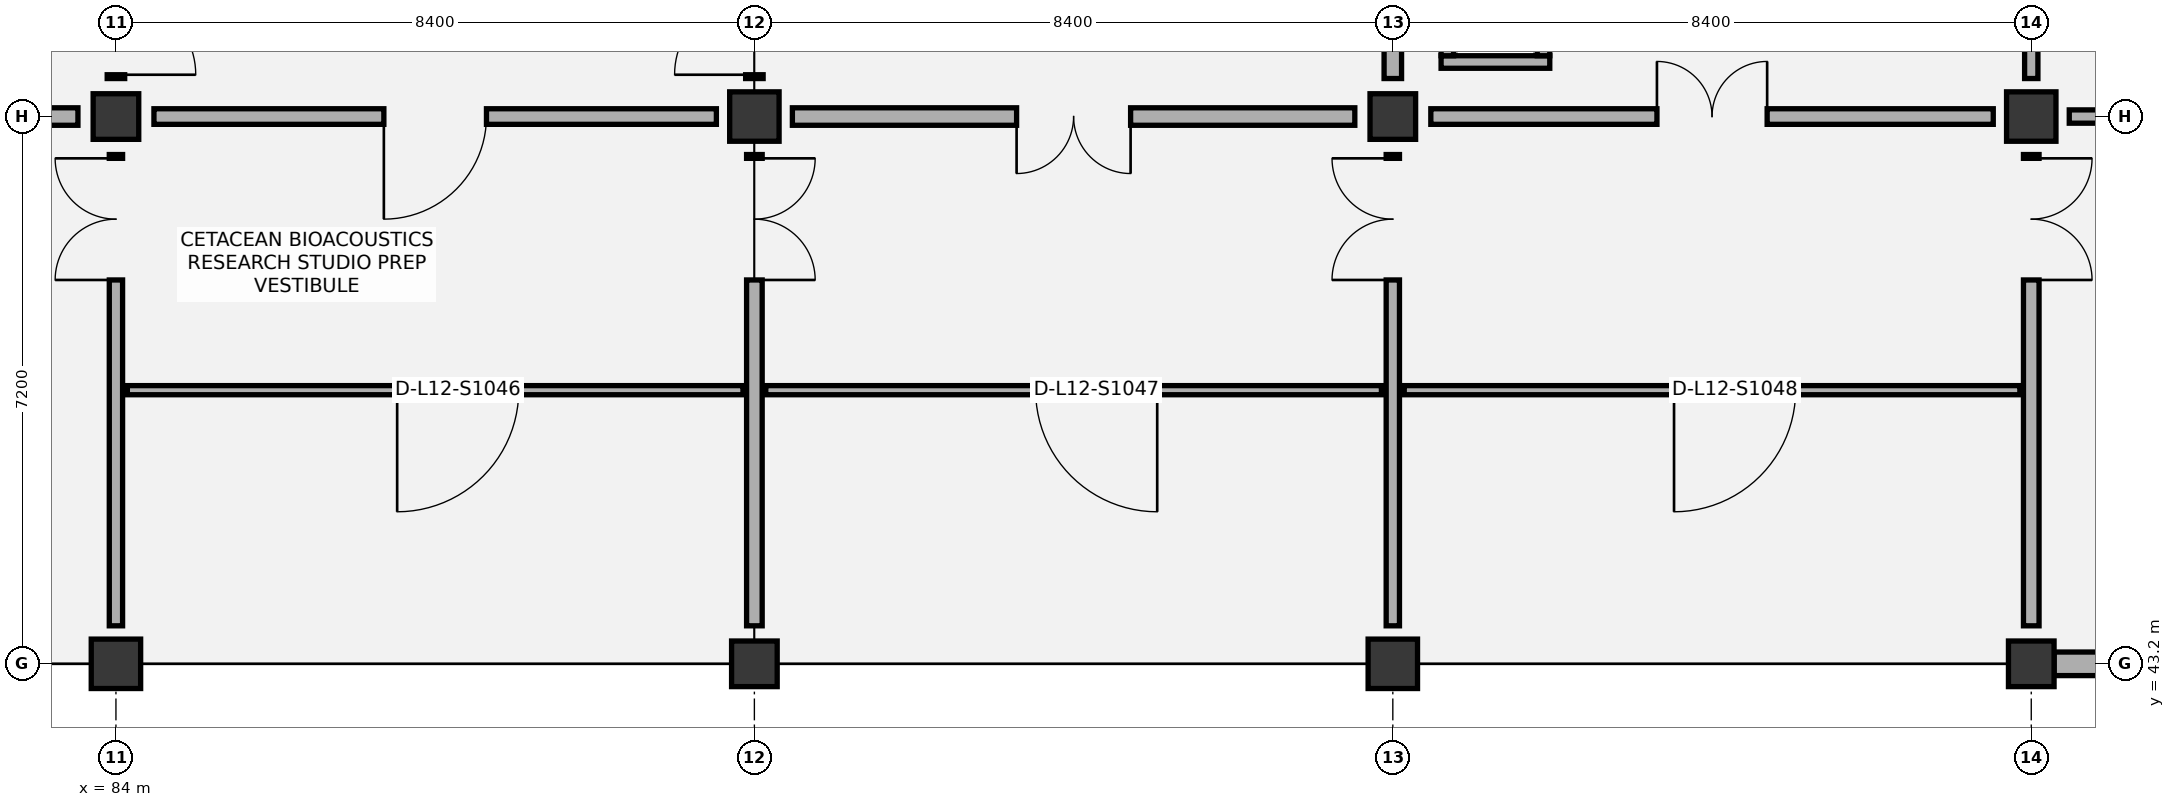
"""IFC4 building model, lengths in metres.
Left out: names, types, materials, properties, quantities, classifications, styles, units other than length and angle.
Written with IfcOpenShell. Run it as: python <this file> out.ifc"""

import sys

from ifc_helpers import new_model, si_unit, direction, frame, frame_2d, origin, origin_2d, place, context, subcontext, project, spatial, rectangle, extrude, element, fill, save


model = new_model("IFC4")
c1 = context("Model", 3, precision=1e-05, world=origin(), true_north=direction((0.0, 1.0)))
c2 = subcontext(c1, "Body", "Model", "MODEL_VIEW")
j1 = project(units=[si_unit("LENGTHUNIT", "METRE"), si_unit("PLANEANGLEUNIT", "RADIAN")], contexts=[c1])
p1 = place(None, origin())
s1 = spatial("IfcSite", under=j1, at=p1, CompositionType="ELEMENT")
p2 = place(p1, origin())
s2 = spatial("IfcBuilding", under=s1, at=p2, CompositionType="ELEMENT")
p3 = place(p2, frame((0.0, 0.0, 56.4)))
s3 = spatial("IfcBuildingStorey", under=s2, at=p3, CompositionType="ELEMENT", Elevation=56.4)
p4 = place(p3, frame((84.0, 43.2, 0.0), z_axis=(0.0, 0.0, 1.0), x_axis=(1.0, 0.0, 0.0)))
e1 = element("IfcColumn", 1, at=p4, inside=s3, PredefinedType="COLUMN", context=c2, shape_type="SweptSolid", body=[
    extrude(rectangle(XDim=0.65, YDim=0.65, at=origin_2d()), origin(), (0.0, 0.0, 1.0), 4.2),
])
for number, where, z_axis, x_axis in (
    (2, (84.0, 50.4, 0.0), (0.0, 0.0, 1.0), (1.0, 0.0, 0.0)),
    (3, (92.4, 43.2, 0.0), (0.0, 0.0, 1.0), (1.0, 0.0, 0.0)),
):
    element("IfcColumn", number, at=place(p3, frame(where, z_axis=z_axis, x_axis=x_axis)), inside=s3, PredefinedType="COLUMN", context=c2, shape_type="SweptSolid", body=[
        extrude(rectangle(XDim=0.6, YDim=0.6, at=origin_2d()), origin(), (0.0, 0.0, 1.0), 4.2),
    ])
for number, where, z_axis, x_axis in (
    (4, (92.4, 50.4, 0.0), (0.0, 0.0, 1.0), (1.0, 0.0, 0.0)),
    (5, (100.8, 43.2, 0.0), (0.0, 0.0, 1.0), (1.0, 0.0, 0.0)),
):
    element("IfcColumn", number, at=place(p3, frame(where, z_axis=z_axis, x_axis=x_axis)), inside=s3, PredefinedType="COLUMN", context=c2, shape_type="SweptSolid", body=[
        extrude(rectangle(XDim=0.65, YDim=0.65, at=origin_2d()), origin(), (0.0, 0.0, 1.0), 4.2),
    ])
for number, where, z_axis, x_axis in (
    (6, (100.8, 50.4, 0.0), (0.0, 0.0, 1.0), (1.0, 0.0, 0.0)),
    (7, (109.2, 43.2, 0.0), (0.0, 0.0, 1.0), (1.0, 0.0, 0.0)),
):
    element("IfcColumn", number, at=place(p3, frame(where, z_axis=z_axis, x_axis=x_axis)), inside=s3, PredefinedType="COLUMN", context=c2, shape_type="SweptSolid", body=[
        extrude(rectangle(XDim=0.6, YDim=0.6, at=origin_2d()), origin(), (0.0, 0.0, 1.0), 4.2),
    ])
p5 = place(p3, frame((109.2, 50.4, 0.0), z_axis=(0.0, 0.0, 1.0), x_axis=(1.0, 0.0, 0.0)))
e8 = element("IfcColumn", 8, at=p5, inside=s3, PredefinedType="COLUMN", context=c2, shape_type="SweptSolid", body=[
    extrude(rectangle(XDim=0.65, YDim=0.65, at=origin_2d()), origin(), (0.0, 0.0, 1.0), 4.2),
])
p6 = place(p3, frame((109.5, 43.2, 0.0), z_axis=(0.0, 0.0, 1.0), x_axis=(1.0, 0.0, 0.0)))
e9 = element("IfcWall", 9, at=p6, inside=s3, PredefinedType="SOLIDWALL", context=c2, shape_type="SweptSolid", body=[
    extrude(rectangle(XDim=7.775, YDim=0.31, at=frame_2d((3.887, 0.0))), origin(), (0.0, 0.0, 1.0), 3.295),
])
p7 = place(p6, frame((2.538, 0.0, 0.95)))
e10 = element("IfcOpeningElement", 10, at=p7, cuts=e9, PredefinedType="OPENING", context=c2, shape_type="SweptSolid", body=[
    extrude(rectangle(XDim=2.7, YDim=1.65, at=frame_2d((1.35, 0.825))), frame((0.0, 0.165, 0.0), z_axis=(0.0, -1.0, 0.0), x_axis=(1.0, 0.0, 0.0)), (0.0, 0.0, 1.0), 0.33),
])
p8 = place(p3, frame((101.435, 51.117, 0.0), z_axis=(0.0, 0.0, 1.0), x_axis=(1.0, 0.0, 0.0)))
e11 = element("IfcWall", 11, at=p8, inside=s3, PredefinedType="PARTITIONING", context=c2, shape_type="SweptSolid", body=[
    extrude(rectangle(XDim=1.43, YDim=0.165, at=frame_2d((0.715, 0.0))), origin(), (0.0, 0.0, 1.0), 3.85),
])
for number, where, z_axis, x_axis in (
    (12, (101.518, 51.2, 0.0), (0.0, 0.0, 1.0), (0.0, 1.0, 0.0)),
    (13, (102.782, 51.2, 0.0), (0.0, 0.0, 1.0), (0.0, 1.0, 0.0)),
):
    element("IfcWall", number, at=place(p3, frame(where, z_axis=z_axis, x_axis=x_axis)), inside=s3, PredefinedType="PARTITIONING", context=c2, shape_type="SweptSolid", body=[
        extrude(rectangle(XDim=0.8, YDim=0.165, at=frame_2d((0.4, 0.0))), origin(), (0.0, 0.0, 1.0), 3.85),
    ])
p9 = place(p3, frame((84.15, 46.8, 0.0), z_axis=(0.0, 0.0, 1.0), x_axis=(1.0, 0.0, 0.0)))
e14 = element("IfcWall", 14, at=p9, inside=s3, PredefinedType="PARTITIONING", context=c2, shape_type="SweptSolid", body=[
    extrude(rectangle(XDim=8.1, YDim=0.12, at=frame_2d((4.05, 0.0))), origin(), (0.0, 0.0, 1.0), 3.92),
])
p10 = place(p9, frame((3.55, 0.0, 0.0)))
e15 = element("IfcOpeningElement", 15, at=p10, cuts=e14, PredefinedType="OPENING", context=c2, shape_type="SweptSolid", body=[
    extrude(rectangle(XDim=1.6, YDim=2.2, at=frame_2d((0.8, 1.1))), frame((0.0, 0.07, 0.0), z_axis=(0.0, -1.0, 0.0), x_axis=(1.0, 0.0, 0.0)), (0.0, 0.0, 1.0), 0.14),
])
p11 = place(p3, frame((92.55, 46.8, 0.0), z_axis=(0.0, 0.0, 1.0), x_axis=(1.0, 0.0, 0.0)))
e16 = element("IfcWall", 16, at=p11, inside=s3, PredefinedType="PARTITIONING", context=c2, shape_type="SweptSolid", body=[
    extrude(rectangle(XDim=8.1, YDim=0.12, at=frame_2d((4.05, 0.0))), origin(), (0.0, 0.0, 1.0), 3.92),
])
p12 = place(p11, frame((3.55, 0.0, 0.0)))
e17 = element("IfcOpeningElement", 17, at=p12, cuts=e16, PredefinedType="OPENING", context=c2, shape_type="SweptSolid", body=[
    extrude(rectangle(XDim=1.6, YDim=2.2, at=frame_2d((0.8, 1.1))), frame((0.0, 0.07, 0.0), z_axis=(0.0, -1.0, 0.0), x_axis=(1.0, 0.0, 0.0)), (0.0, 0.0, 1.0), 0.14),
])
p13 = place(p3, frame((100.95, 46.8, 0.0), z_axis=(0.0, 0.0, 1.0), x_axis=(1.0, 0.0, 0.0)))
e18 = element("IfcWall", 18, at=p13, inside=s3, PredefinedType="PARTITIONING", context=c2, shape_type="SweptSolid", body=[
    extrude(rectangle(XDim=8.1, YDim=0.12, at=frame_2d((4.05, 0.0))), origin(), (0.0, 0.0, 1.0), 3.92),
])
p14 = place(p13, frame((3.55, 0.0, 0.0)))
e19 = element("IfcOpeningElement", 19, at=p14, cuts=e18, PredefinedType="OPENING", context=c2, shape_type="SweptSolid", body=[
    extrude(rectangle(XDim=1.6, YDim=2.2, at=frame_2d((0.8, 1.1))), frame((0.0, 0.07, 0.0), z_axis=(0.0, -1.0, 0.0), x_axis=(1.0, 0.0, 0.0)), (0.0, 0.0, 1.0), 0.14),
])
p15 = place(p3, frame((84.0, 43.7, 0.0), z_axis=(0.0, 0.0, 1.0), x_axis=(0.0, 1.0, 0.0)))
e20 = element("IfcWall", 20, at=p15, inside=s3, PredefinedType="PARTITIONING", context=c2, shape_type="SweptSolid", body=[
    extrude(rectangle(XDim=6.2, YDim=0.175, at=frame_2d((3.1, 0.0))), origin(), (0.0, 0.0, 1.0), 3.415),
])
p16 = place(p15, frame((4.55, 0.0, 0.0)))
e21 = element("IfcOpeningElement", 21, at=p16, cuts=e20, PredefinedType="OPENING", context=c2, shape_type="SweptSolid", body=[
    extrude(rectangle(XDim=1.6, YDim=2.2, at=frame_2d((0.8, 1.1))), frame((0.0, 0.097, 0.0), z_axis=(0.0, -1.0, 0.0), x_axis=(1.0, 0.0, 0.0)), (0.0, 0.0, 1.0), 0.195),
])
p17 = place(p3, frame((76.1, 50.4, 0.0), z_axis=(0.0, 0.0, 1.0), x_axis=(1.0, 0.0, 0.0)))
e22 = element("IfcWall", 22, at=p17, inside=s3, PredefinedType="PARTITIONING", context=c2, shape_type="SweptSolid", body=[
    extrude(rectangle(XDim=7.4, YDim=0.23, at=frame_2d((3.7, 0.0))), origin(), (0.0, 0.0, 1.0), 3.415),
])
p18 = place(p17, frame((2.95, 0.0, 0.0)))
e23 = element("IfcOpeningElement", 23, at=p18, cuts=e22, PredefinedType="OPENING", context=c2, shape_type="SweptSolid", body=[
    extrude(rectangle(XDim=1.5, YDim=2.15, at=frame_2d((0.75, 1.075))), frame((0.0, 0.125, 0.0), z_axis=(0.0, -1.0, 0.0), x_axis=(1.0, 0.0, 0.0)), (0.0, 0.0, 1.0), 0.25),
])
p19 = place(p3, frame((84.0, 50.9, 0.0), z_axis=(0.0, 0.0, 1.0), x_axis=(0.0, 1.0, 0.0)))
e24 = element("IfcWall", 24, at=p19, inside=s3, PredefinedType="PARTITIONING", context=c2, shape_type="SweptSolid", body=[
    extrude(rectangle(XDim=6.2, YDim=0.23, at=frame_2d((3.1, 0.0))), origin(), (0.0, 0.0, 1.0), 3.415),
])
p20 = place(p19, frame((0.05, 0.0, 0.0)))
e25 = element("IfcOpeningElement", 25, at=p20, cuts=e24, PredefinedType="OPENING", context=c2, shape_type="SweptSolid", body=[
    extrude(rectangle(XDim=1.05, YDim=2.15, at=frame_2d((0.525, 1.075))), frame((0.0, 0.125, 0.0), z_axis=(0.0, -1.0, 0.0), x_axis=(1.0, 0.0, 0.0)), (0.0, 0.0, 1.0), 0.25),
])
p21 = place(p3, frame((92.4, 43.7, 0.0), z_axis=(0.0, 0.0, 1.0), x_axis=(0.0, 1.0, 0.0)))
e26 = element("IfcWall", 26, at=p21, inside=s3, PredefinedType="PARTITIONING", context=c2, shape_type="SweptSolid", body=[
    extrude(rectangle(XDim=6.2, YDim=0.205, at=frame_2d((3.1, 0.0))), origin(), (0.0, 0.0, 1.0), 3.415),
])
p22 = place(p21, frame((4.55, 0.0, 0.0)))
e27 = element("IfcOpeningElement", 27, at=p22, cuts=e26, PredefinedType="OPENING", context=c2, shape_type="SweptSolid", body=[
    extrude(rectangle(XDim=1.6, YDim=2.2, at=frame_2d((0.8, 1.1))), frame((0.0, 0.113, 0.0), z_axis=(0.0, -1.0, 0.0), x_axis=(1.0, 0.0, 0.0)), (0.0, 0.0, 1.0), 0.225),
])
p23 = place(p3, frame((84.5, 50.4, 0.0), z_axis=(0.0, 0.0, 1.0), x_axis=(1.0, 0.0, 0.0)))
e28 = element("IfcWall", 28, at=p23, inside=s3, PredefinedType="PARTITIONING", context=c2, shape_type="SweptSolid", body=[
    extrude(rectangle(XDim=7.4, YDim=0.205, at=frame_2d((3.7, 0.0))), origin(), (0.0, 0.0, 1.0), 3.415),
])
p24 = place(p23, frame((3.025, 0.0, 0.0)))
e29 = element("IfcOpeningElement", 29, at=p24, cuts=e28, PredefinedType="OPENING", context=c2, shape_type="SweptSolid", body=[
    extrude(rectangle(XDim=1.35, YDim=2.15, at=frame_2d((0.675, 1.075))), frame((0.0, 0.113, 0.0), z_axis=(0.0, -1.0, 0.0), x_axis=(1.0, 0.0, 0.0)), (0.0, 0.0, 1.0), 0.225),
])
p25 = place(p3, frame((92.4, 50.9, 0.0), z_axis=(0.0, 0.0, 1.0), x_axis=(0.0, 1.0, 0.0)))
e30 = element("IfcWall", 30, at=p25, inside=s3, PredefinedType="PARTITIONING", context=c2, shape_type="SweptSolid", body=[
    extrude(rectangle(XDim=6.2, YDim=0.23, at=frame_2d((3.1, 0.0))), origin(), (0.0, 0.0, 1.0), 3.515),
])
p26 = place(p25, frame((0.05, 0.0, 0.0)))
e31 = element("IfcOpeningElement", 31, at=p26, cuts=e30, PredefinedType="OPENING", context=c2, shape_type="SweptSolid", body=[
    extrude(rectangle(XDim=1.05, YDim=2.15, at=frame_2d((0.525, 1.075))), frame((0.0, 0.125, 0.0), z_axis=(0.0, -1.0, 0.0), x_axis=(1.0, 0.0, 0.0)), (0.0, 0.0, 1.0), 0.25),
])
p27 = place(p3, frame((100.8, 43.7, 0.0), z_axis=(0.0, 0.0, 1.0), x_axis=(0.0, 1.0, 0.0)))
e32 = element("IfcWall", 32, at=p27, inside=s3, PredefinedType="PARTITIONING", context=c2, shape_type="SweptSolid", body=[
    extrude(rectangle(XDim=6.2, YDim=0.175, at=frame_2d((3.1, 0.0))), origin(), (0.0, 0.0, 1.0), 3.515),
])
p28 = place(p27, frame((4.55, 0.0, 0.0)))
e33 = element("IfcOpeningElement", 33, at=p28, cuts=e32, PredefinedType="OPENING", context=c2, shape_type="SweptSolid", body=[
    extrude(rectangle(XDim=1.6, YDim=2.2, at=frame_2d((0.8, 1.1))), frame((0.0, 0.097, 0.0), z_axis=(0.0, -1.0, 0.0), x_axis=(1.0, 0.0, 0.0)), (0.0, 0.0, 1.0), 0.195),
])
p29 = place(p3, frame((92.9, 50.4, 0.0), z_axis=(0.0, 0.0, 1.0), x_axis=(1.0, 0.0, 0.0)))
e34 = element("IfcWall", 34, at=p29, inside=s3, PredefinedType="PARTITIONING", context=c2, shape_type="SweptSolid", body=[
    extrude(rectangle(XDim=7.4, YDim=0.23, at=frame_2d((3.7, 0.0))), origin(), (0.0, 0.0, 1.0), 3.415),
])
p30 = place(p29, frame((2.95, 0.0, 0.0)))
e35 = element("IfcOpeningElement", 35, at=p30, cuts=e34, PredefinedType="OPENING", context=c2, shape_type="SweptSolid", body=[
    extrude(rectangle(XDim=1.5, YDim=2.15, at=frame_2d((0.75, 1.075))), frame((0.0, 0.125, 0.0), z_axis=(0.0, -1.0, 0.0), x_axis=(1.0, 0.0, 0.0)), (0.0, 0.0, 1.0), 0.25),
])
p31 = place(p3, frame((100.8, 50.9, 0.0), z_axis=(0.0, 0.0, 1.0), x_axis=(0.0, 1.0, 0.0)))
e36 = element("IfcWall", 36, at=p31, inside=s3, PredefinedType="PARTITIONING", context=c2, shape_type="SweptSolid", body=[
    extrude(rectangle(XDim=6.2, YDim=0.23, at=frame_2d((3.1, 0.0))), origin(), (0.0, 0.0, 1.0), 3.415),
])
p32 = place(p3, frame((109.2, 43.7, 0.0), z_axis=(0.0, 0.0, 1.0), x_axis=(0.0, 1.0, 0.0)))
e37 = element("IfcWall", 37, at=p32, inside=s3, PredefinedType="PARTITIONING", context=c2, shape_type="SweptSolid", body=[
    extrude(rectangle(XDim=6.2, YDim=0.205, at=frame_2d((3.1, 0.0))), origin(), (0.0, 0.0, 1.0), 3.345),
])
p33 = place(p32, frame((4.55, 0.0, 0.0)))
e38 = element("IfcOpeningElement", 38, at=p33, cuts=e37, PredefinedType="OPENING", context=c2, shape_type="SweptSolid", body=[
    extrude(rectangle(XDim=1.6, YDim=2.2, at=frame_2d((0.8, 1.1))), frame((0.0, 0.113, 0.0), z_axis=(0.0, -1.0, 0.0), x_axis=(1.0, 0.0, 0.0)), (0.0, 0.0, 1.0), 0.225),
])
p34 = place(p3, frame((101.3, 50.4, 0.0), z_axis=(0.0, 0.0, 1.0), x_axis=(1.0, 0.0, 0.0)))
e39 = element("IfcWall", 39, at=p34, inside=s3, PredefinedType="PARTITIONING", context=c2, shape_type="SweptSolid", body=[
    extrude(rectangle(XDim=7.4, YDim=0.205, at=frame_2d((3.7, 0.0))), origin(), (0.0, 0.0, 1.0), 3.415),
])
p35 = place(p34, frame((2.975, 0.0, 0.0)))
e40 = element("IfcOpeningElement", 40, at=p35, cuts=e39, PredefinedType="OPENING", context=c2, shape_type="SweptSolid", body=[
    extrude(rectangle(XDim=1.45, YDim=2.2, at=frame_2d((0.725, 1.1))), frame((0.0, 0.113, 0.0), z_axis=(0.0, -1.0, 0.0), x_axis=(1.0, 0.0, 0.0)), (0.0, 0.0, 1.0), 0.225),
])
p36 = place(p3, frame((109.2, 50.9, 0.0), z_axis=(0.0, 0.0, 1.0), x_axis=(0.0, 1.0, 0.0)))
e41 = element("IfcWall", 41, at=p36, inside=s3, PredefinedType="PARTITIONING", context=c2, shape_type="SweptSolid", body=[
    extrude(rectangle(XDim=6.2, YDim=0.175, at=frame_2d((3.1, 0.0))), origin(), (0.0, 0.0, 1.0), 3.555),
])
p37 = place(p3, frame((109.7, 50.4, 0.0), z_axis=(0.0, 0.0, 1.0), x_axis=(1.0, 0.0, 0.0)))
e42 = element("IfcWall", 42, at=p37, inside=s3, PredefinedType="PARTITIONING", context=c2, shape_type="SweptSolid", body=[
    extrude(rectangle(XDim=7.4, YDim=0.175, at=frame_2d((3.7, 0.0))), origin(), (0.0, 0.0, 1.0), 3.345),
])
p38 = place(p10, frame((1.6, 0.0, 0.0), z_axis=(0.0, 0.0, 1.0), x_axis=(-1.0, 0.0, 0.0)))
e43 = element("IfcDoor", 43, at=p38, inside=s3, OperationType="SINGLE_SWING_RIGHT", PredefinedType="DOOR", context=c2, shape_type="SweptSolid", body=[
    extrude(rectangle(XDim=1.6, YDim=2.2, at=frame_2d((0.8, 1.1))), frame((0.0, 0.025, 0.0), z_axis=(0.0, -1.0, 0.0), x_axis=(1.0, 0.0, 0.0)), (0.0, 0.0, 1.0), 0.05),
])
fill(e15, e43)
p39 = place(p12, frame((1.6, 0.0, 0.0), z_axis=(0.0, 0.0, 1.0), x_axis=(-1.0, 0.0, 0.0)))
e44 = element("IfcDoor", 44, at=p39, inside=s3, OperationType="SINGLE_SWING_LEFT", PredefinedType="DOOR", context=c2, shape_type="SweptSolid", body=[
    extrude(rectangle(XDim=1.6, YDim=2.2, at=frame_2d((0.8, 1.1))), frame((0.0, 0.025, 0.0), z_axis=(0.0, -1.0, 0.0), x_axis=(1.0, 0.0, 0.0)), (0.0, 0.0, 1.0), 0.05),
])
fill(e17, e44)
p40 = place(p14, frame((1.6, 0.0, 0.0), z_axis=(0.0, 0.0, 1.0), x_axis=(-1.0, 0.0, 0.0)))
e45 = element("IfcDoor", 45, at=p40, inside=s3, OperationType="SINGLE_SWING_RIGHT", PredefinedType="DOOR", context=c2, shape_type="SweptSolid", body=[
    extrude(rectangle(XDim=1.6, YDim=2.2, at=frame_2d((0.8, 1.1))), frame((0.0, 0.025, 0.0), z_axis=(0.0, -1.0, 0.0), x_axis=(1.0, 0.0, 0.0)), (0.0, 0.0, 1.0), 0.05),
])
fill(e19, e45)
p41 = place(p16, origin())
e46 = element("IfcDoor", 46, at=p41, inside=s3, OperationType="DOUBLE_DOOR_SINGLE_SWING", PredefinedType="DOOR", context=c2, shape_type="SweptSolid", body=[
    extrude(rectangle(XDim=1.6, YDim=2.2, at=frame_2d((0.8, 1.1))), frame((0.0, 0.025, 0.0), z_axis=(0.0, -1.0, 0.0), x_axis=(1.0, 0.0, 0.0)), (0.0, 0.0, 1.0), 0.05),
])
fill(e21, e46)
p42 = place(p20, frame((1.05, 0.0, 0.0), z_axis=(0.0, 0.0, 1.0), x_axis=(-1.0, 0.0, 0.0)))
e47 = element("IfcDoor", 47, at=p42, inside=s3, OperationType="SINGLE_SWING_RIGHT", PredefinedType="DOOR", context=c2, shape_type="SweptSolid", body=[
    extrude(rectangle(XDim=1.05, YDim=2.15, at=frame_2d((0.525, 1.075))), frame((0.0, 0.025, 0.0), z_axis=(0.0, -1.0, 0.0), x_axis=(1.0, 0.0, 0.0)), (0.0, 0.0, 1.0), 0.05),
])
fill(e25, e47)
p43 = place(p22, frame((1.6, 0.0, 0.0), z_axis=(0.0, 0.0, 1.0), x_axis=(-1.0, 0.0, 0.0)))
e48 = element("IfcDoor", 48, at=p43, inside=s3, OperationType="DOUBLE_DOOR_SINGLE_SWING", PredefinedType="DOOR", context=c2, shape_type="SweptSolid", body=[
    extrude(rectangle(XDim=1.6, YDim=2.2, at=frame_2d((0.8, 1.1))), frame((0.0, 0.025, 0.0), z_axis=(0.0, -1.0, 0.0), x_axis=(1.0, 0.0, 0.0)), (0.0, 0.0, 1.0), 0.05),
])
fill(e27, e48)
p44 = place(p24, frame((1.35, 0.0, 0.0), z_axis=(0.0, 0.0, 1.0), x_axis=(-1.0, 0.0, 0.0)))
e49 = element("IfcDoor", 49, at=p44, inside=s3, OperationType="SINGLE_SWING_RIGHT", PredefinedType="DOOR", context=c2, shape_type="SweptSolid", body=[
    extrude(rectangle(XDim=1.35, YDim=2.15, at=frame_2d((0.675, 1.075))), frame((0.0, 0.025, 0.0), z_axis=(0.0, -1.0, 0.0), x_axis=(1.0, 0.0, 0.0)), (0.0, 0.0, 1.0), 0.05),
])
fill(e29, e49)
p45 = place(p26, origin())
e50 = element("IfcDoor", 50, at=p45, inside=s3, OperationType="SINGLE_SWING_LEFT", PredefinedType="DOOR", context=c2, shape_type="SweptSolid", body=[
    extrude(rectangle(XDim=1.05, YDim=2.15, at=frame_2d((0.525, 1.075))), frame((0.0, 0.025, 0.0), z_axis=(0.0, -1.0, 0.0), x_axis=(1.0, 0.0, 0.0)), (0.0, 0.0, 1.0), 0.05),
])
fill(e31, e50)
p46 = place(p28, origin())
e51 = element("IfcDoor", 51, at=p46, inside=s3, OperationType="DOUBLE_DOOR_SINGLE_SWING", PredefinedType="DOOR", context=c2, shape_type="SweptSolid", body=[
    extrude(rectangle(XDim=1.6, YDim=2.2, at=frame_2d((0.8, 1.1))), frame((0.0, 0.025, 0.0), z_axis=(0.0, -1.0, 0.0), x_axis=(1.0, 0.0, 0.0)), (0.0, 0.0, 1.0), 0.05),
])
fill(e33, e51)
p47 = place(p30, frame((1.5, 0.0, 0.0), z_axis=(0.0, 0.0, 1.0), x_axis=(-1.0, 0.0, 0.0)))
e52 = element("IfcDoor", 52, at=p47, inside=s3, OperationType="DOUBLE_DOOR_SINGLE_SWING", PredefinedType="DOOR", context=c2, shape_type="SweptSolid", body=[
    extrude(rectangle(XDim=1.5, YDim=2.15, at=frame_2d((0.75, 1.075))), frame((0.0, 0.025, 0.0), z_axis=(0.0, -1.0, 0.0), x_axis=(1.0, 0.0, 0.0)), (0.0, 0.0, 1.0), 0.05),
])
fill(e35, e52)
p48 = place(p33, frame((1.6, 0.0, 0.0), z_axis=(0.0, 0.0, 1.0), x_axis=(-1.0, 0.0, 0.0)))
e53 = element("IfcDoor", 53, at=p48, inside=s3, OperationType="DOUBLE_DOOR_SINGLE_SWING", PredefinedType="DOOR", context=c2, shape_type="SweptSolid", body=[
    extrude(rectangle(XDim=1.6, YDim=2.2, at=frame_2d((0.8, 1.1))), frame((0.0, 0.025, 0.0), z_axis=(0.0, -1.0, 0.0), x_axis=(1.0, 0.0, 0.0)), (0.0, 0.0, 1.0), 0.05),
])
fill(e38, e53)
p49 = place(p35, origin())
e54 = element("IfcDoor", 54, at=p49, inside=s3, OperationType="DOUBLE_DOOR_SINGLE_SWING", PredefinedType="DOOR", context=c2, shape_type="SweptSolid", body=[
    extrude(rectangle(XDim=1.45, YDim=2.2, at=frame_2d((0.725, 1.1))), frame((0.0, 0.025, 0.0), z_axis=(0.0, -1.0, 0.0), x_axis=(1.0, 0.0, 0.0)), (0.0, 0.0, 1.0), 0.05),
])
fill(e40, e54)
save(model, sys.argv[1])
